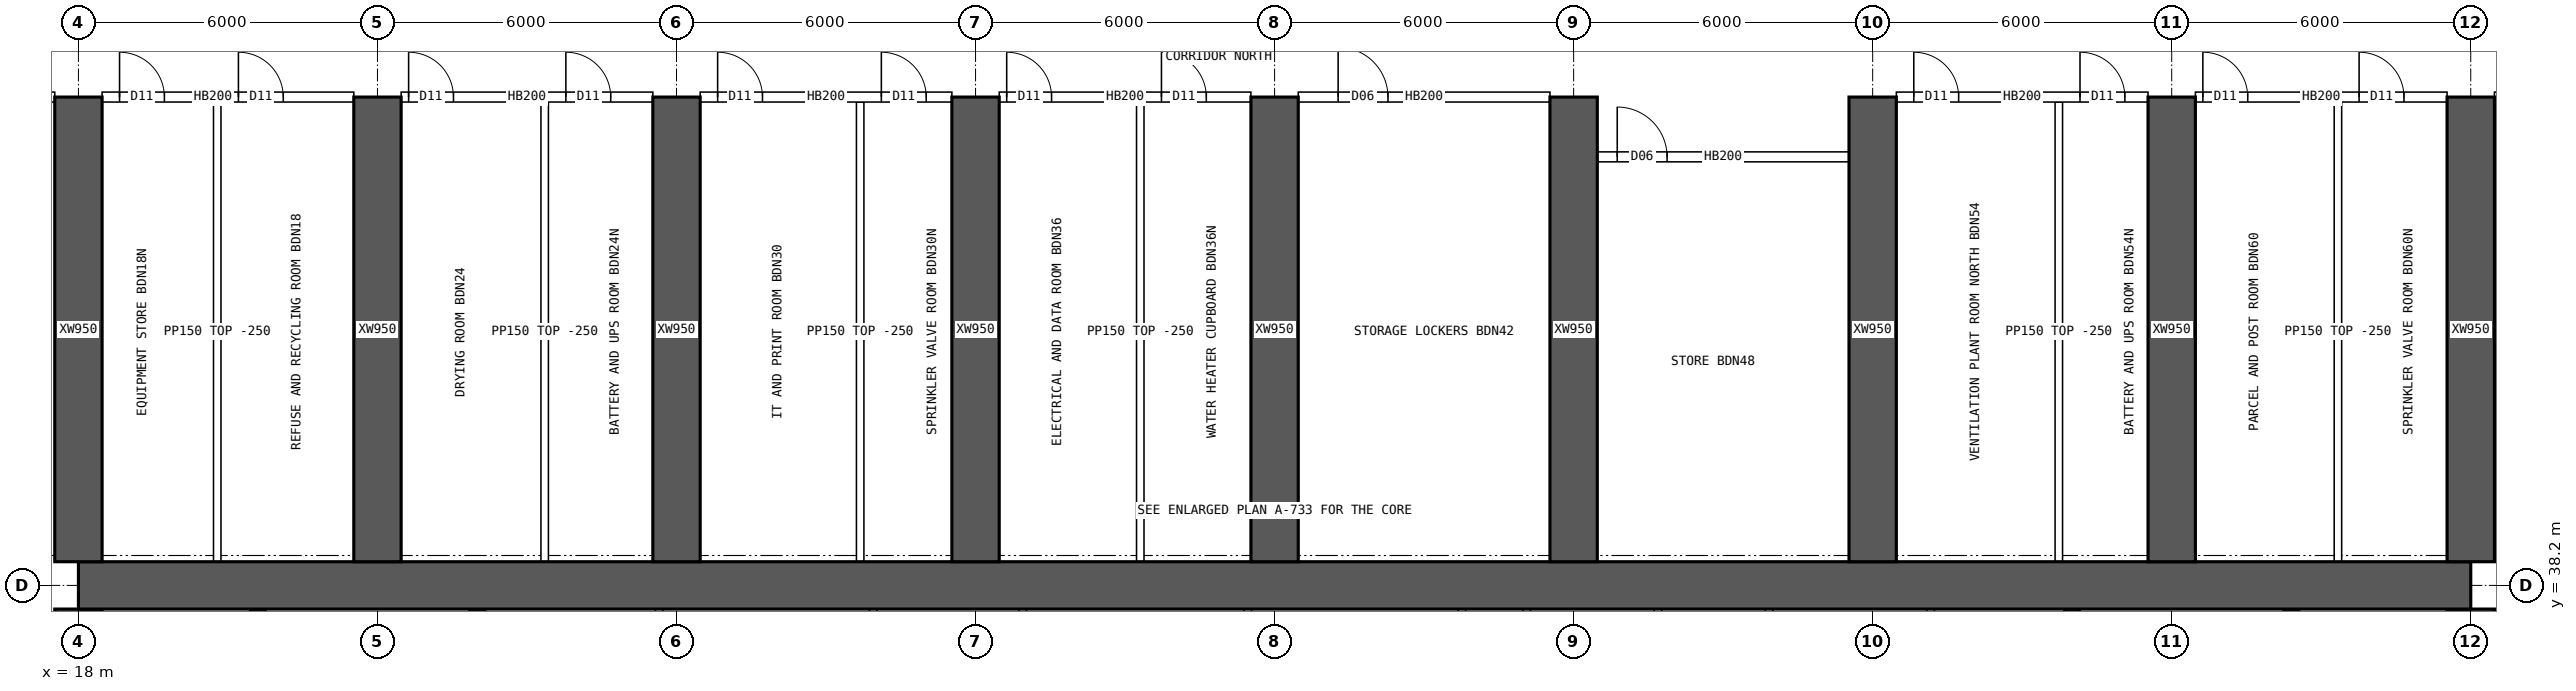
"""IFC4 building model, lengths in metres.
Left out: names, types, materials, properties, quantities, classifications, styles, units other than length and angle.
Written with IfcOpenShell. Run it as: python <this file> out.ifc"""

import sys

from ifc_helpers import new_model, si_unit, direction, frame, frame_2d, origin, place, context, subcontext, project, spatial, rectangle, extrude, element, fill, save


model = new_model("IFC4")
c1 = context("Model", 3, precision=1e-05, world=origin(), true_north=direction((0.0, 1.0)))
c2 = subcontext(c1, "Body", "Model", "MODEL_VIEW")
j1 = project(units=[si_unit("LENGTHUNIT", "METRE"), si_unit("PLANEANGLEUNIT", "RADIAN")], contexts=[c1])
p1 = place(None, origin())
s1 = spatial("IfcSite", under=j1, at=p1, CompositionType="ELEMENT")
p2 = place(p1, origin())
s2 = spatial("IfcBuilding", under=s1, at=p2, CompositionType="ELEMENT")
p3 = place(p2, frame((0.0, 0.0, 121.9)))
s3 = spatial("IfcBuildingStorey", under=s2, at=p3, CompositionType="ELEMENT", Elevation=121.9)
p4 = place(p3, frame((18.0, 38.2, 0.0), z_axis=(0.0, 0.0, 1.0), x_axis=(1.0, 0.0, 0.0)))
e1 = element("IfcWall", 1, at=p4, inside=s3, PredefinedType="SHEAR", context=c2, shape_type="SweptSolid", body=[
    extrude(rectangle(XDim=48.0, YDim=0.95, at=frame_2d((24.0, 0.0))), origin(), (0.0, 0.0, 1.0), 3.75),
])
p5 = place(p3, frame((18.0, 26.275, 0.0), z_axis=(0.0, 0.0, 1.0), x_axis=(0.0, 1.0, 0.0)))
e2 = element("IfcWall", 2, at=p5, inside=s3, PredefinedType="SHEAR", context=c2, shape_type="SweptSolid", body=[
    extrude(rectangle(XDim=11.45, YDim=0.95, at=frame_2d((5.725, 0.0))), origin(), (0.0, 0.0, 1.0), 3.75),
])
p6 = place(p5, frame((5.025, 0.0, 0.0)))
e3 = element("IfcOpeningElement", 3, at=p6, cuts=e2, PredefinedType="OPENING", context=c2, shape_type="SweptSolid", body=[
    extrude(rectangle(XDim=1.2, YDim=2.1, at=frame_2d((0.6, 1.05))), frame((0.0, 0.485, 0.0), z_axis=(0.0, -1.0, 0.0), x_axis=(1.0, 0.0, 0.0)), (0.0, 0.0, 1.0), 0.97),
])
p7 = place(p3, frame((66.0, 26.275, 0.0), z_axis=(0.0, 0.0, 1.0), x_axis=(0.0, 1.0, 0.0)))
e4 = element("IfcWall", 4, at=p7, inside=s3, PredefinedType="SHEAR", context=c2, shape_type="SweptSolid", body=[
    extrude(rectangle(XDim=11.45, YDim=0.95, at=frame_2d((5.725, 0.0))), origin(), (0.0, 0.0, 1.0), 3.75),
])
p8 = place(p7, frame((5.025, 0.0, 0.0)))
e5 = element("IfcOpeningElement", 5, at=p8, cuts=e4, PredefinedType="OPENING", context=c2, shape_type="SweptSolid", body=[
    extrude(rectangle(XDim=1.2, YDim=2.1, at=frame_2d((0.6, 1.05))), frame((0.0, 0.485, 0.0), z_axis=(0.0, -1.0, 0.0), x_axis=(1.0, 0.0, 0.0)), (0.0, 0.0, 1.0), 0.97),
])
for number, where, z_axis, x_axis in (
    (6, (21.6, 34.75, 0.0), (0.0, 0.0, 1.0), (0.0, 1.0, 0.0)),
    (7, (62.4, 34.75, 0.0), (0.0, 0.0, 1.0), (0.0, 1.0, 0.0)),
    (8, (26.0, 34.75, 0.0), (0.0, 0.0, 1.0), (0.0, 1.0, 0.0)),
    (9, (58.0, 34.75, 0.0), (0.0, 0.0, 1.0), (0.0, 1.0, 0.0)),
):
    element("IfcWall", number, at=place(p3, frame(where, z_axis=z_axis, x_axis=x_axis)), inside=s3, PredefinedType="SHEAR", context=c2, shape_type="SweptSolid", body=[
        extrude(rectangle(XDim=2.975, YDim=0.3, at=frame_2d((1.488, 0.0))), origin(), (0.0, 0.0, 1.0), 3.75),
    ])
for number, where, z_axis, x_axis in (
    (10, (18.0, 38.675, 0.0), (0.0, 0.0, 1.0), (0.0, 1.0, 0.0)),
    (11, (24.0, 38.675, 0.0), (0.0, 0.0, 1.0), (0.0, 1.0, 0.0)),
    (12, (30.0, 38.675, 0.0), (0.0, 0.0, 1.0), (0.0, 1.0, 0.0)),
    (13, (36.0, 38.675, 0.0), (0.0, 0.0, 1.0), (0.0, 1.0, 0.0)),
    (14, (42.0, 38.675, 0.0), (0.0, 0.0, 1.0), (0.0, 1.0, 0.0)),
    (15, (48.0, 38.675, 0.0), (0.0, 0.0, 1.0), (0.0, 1.0, 0.0)),
    (16, (54.0, 38.675, 0.0), (0.0, 0.0, 1.0), (0.0, 1.0, 0.0)),
    (17, (60.0, 38.675, 0.0), (0.0, 0.0, 1.0), (0.0, 1.0, 0.0)),
    (18, (66.0, 38.675, 0.0), (0.0, 0.0, 1.0), (0.0, 1.0, 0.0)),
):
    element("IfcWall", number, at=place(p3, frame(where, z_axis=z_axis, x_axis=x_axis)), inside=s3, PredefinedType="SHEAR", context=c2, shape_type="SweptSolid", body=[
        extrude(rectangle(XDim=9.325, YDim=0.95, at=frame_2d((4.663, 0.0))), origin(), (0.0, 0.0, 1.0), 3.75),
    ])
for number, where, z_axis, x_axis in (
    (19, (29.651, 34.75, 0.0), (0.0, 0.0, 1.0), (0.0, 1.0, 0.0)),
    (20, (33.946, 34.75, 0.0), (0.0, 0.0, 1.0), (0.0, 1.0, 0.0)),
    (21, (36.946, 34.75, 0.0), (0.0, 0.0, 1.0), (0.0, 1.0, 0.0)),
    (22, (41.463, 34.75, 0.0), (0.0, 0.0, 1.0), (0.0, 1.0, 0.0)),
    (23, (45.758, 34.75, 0.0), (0.0, 0.0, 1.0), (0.0, 1.0, 0.0)),
    (24, (47.058, 34.75, 0.0), (0.0, 0.0, 1.0), (0.0, 1.0, 0.0)),
    (25, (49.692, 34.75, 0.0), (0.0, 0.0, 1.0), (0.0, 1.0, 0.0)),
    (26, (51.921, 34.75, 0.0), (0.0, 0.0, 1.0), (0.0, 1.0, 0.0)),
    (27, (55.163, 34.75, 0.0), (0.0, 0.0, 1.0), (0.0, 1.0, 0.0)),
):
    element("IfcWall", number, at=place(p3, frame(where, z_axis=z_axis, x_axis=x_axis)), inside=s3, PredefinedType="SOLIDWALL", context=c2, shape_type="SweptSolid", body=[
        extrude(rectangle(XDim=2.975, YDim=0.15, at=frame_2d((1.488, 0.0))), origin(), (0.0, 0.0, 1.0), 3.5),
    ])
p9 = place(p3, frame((12.475, 48.0, 0.0), z_axis=(0.0, 0.0, 1.0), x_axis=(1.0, 0.0, 0.0)))
e28 = element("IfcWall", 28, at=p9, inside=s3, PredefinedType="SOLIDWALL", context=c2, shape_type="SweptSolid", body=[
    extrude(rectangle(XDim=5.05, YDim=0.2, at=frame_2d((2.525, 0.0))), origin(), (0.0, 0.0, 1.0), 3.5),
])
p10 = place(p9, frame((3.325, 0.0, 0.0)))
e29 = element("IfcOpeningElement", 29, at=p10, cuts=e28, PredefinedType="OPENING", context=c2, shape_type="SweptSolid", body=[
    extrude(rectangle(XDim=1.6, YDim=2.1, at=frame_2d((0.8, 1.05))), frame((0.0, 0.11, 0.0), z_axis=(0.0, -1.0, 0.0), x_axis=(1.0, 0.0, 0.0)), (0.0, 0.0, 1.0), 0.22),
])
p11 = place(p3, frame((18.475, 48.0, 0.0), z_axis=(0.0, 0.0, 1.0), x_axis=(1.0, 0.0, 0.0)))
e30 = element("IfcWall", 30, at=p11, inside=s3, PredefinedType="SOLIDWALL", context=c2, shape_type="SweptSolid", body=[
    extrude(rectangle(XDim=5.05, YDim=0.2, at=frame_2d((2.525, 0.0))), origin(), (0.0, 0.0, 1.0), 3.5),
])
p12 = place(p11, frame((0.35, 0.0, 0.0)))
e31 = element("IfcOpeningElement", 31, at=p12, cuts=e30, PredefinedType="OPENING", context=c2, shape_type="SweptSolid", body=[
    extrude(rectangle(XDim=0.9, YDim=2.1, at=frame_2d((0.45, 1.05))), frame((0.0, 0.11, 0.0), z_axis=(0.0, -1.0, 0.0), x_axis=(1.0, 0.0, 0.0)), (0.0, 0.0, 1.0), 0.22),
])
p13 = place(p11, frame((2.735, 0.0, 0.0)))
e32 = element("IfcOpeningElement", 32, at=p13, cuts=e30, PredefinedType="OPENING", context=c2, shape_type="SweptSolid", body=[
    extrude(rectangle(XDim=0.9, YDim=2.1, at=frame_2d((0.45, 1.05))), frame((0.0, 0.11, 0.0), z_axis=(0.0, -1.0, 0.0), x_axis=(1.0, 0.0, 0.0)), (0.0, 0.0, 1.0), 0.22),
])
p14 = place(p3, frame((24.475, 48.0, 0.0), z_axis=(0.0, 0.0, 1.0), x_axis=(1.0, 0.0, 0.0)))
e33 = element("IfcWall", 33, at=p14, inside=s3, PredefinedType="SOLIDWALL", context=c2, shape_type="SweptSolid", body=[
    extrude(rectangle(XDim=5.05, YDim=0.2, at=frame_2d((2.525, 0.0))), origin(), (0.0, 0.0, 1.0), 3.5),
])
p15 = place(p14, frame((0.15, 0.0, 0.0)))
e34 = element("IfcOpeningElement", 34, at=p15, cuts=e33, PredefinedType="OPENING", context=c2, shape_type="SweptSolid", body=[
    extrude(rectangle(XDim=0.9, YDim=2.1, at=frame_2d((0.45, 1.05))), frame((0.0, 0.11, 0.0), z_axis=(0.0, -1.0, 0.0), x_axis=(1.0, 0.0, 0.0)), (0.0, 0.0, 1.0), 0.22),
])
p16 = place(p14, frame((3.305, 0.0, 0.0)))
e35 = element("IfcOpeningElement", 35, at=p16, cuts=e33, PredefinedType="OPENING", context=c2, shape_type="SweptSolid", body=[
    extrude(rectangle(XDim=0.9, YDim=2.1, at=frame_2d((0.45, 1.05))), frame((0.0, 0.11, 0.0), z_axis=(0.0, -1.0, 0.0), x_axis=(1.0, 0.0, 0.0)), (0.0, 0.0, 1.0), 0.22),
])
p17 = place(p3, frame((30.475, 48.0, 0.0), z_axis=(0.0, 0.0, 1.0), x_axis=(1.0, 0.0, 0.0)))
e36 = element("IfcWall", 36, at=p17, inside=s3, PredefinedType="SOLIDWALL", context=c2, shape_type="SweptSolid", body=[
    extrude(rectangle(XDim=5.05, YDim=0.2, at=frame_2d((2.525, 0.0))), origin(), (0.0, 0.0, 1.0), 3.5),
])
p18 = place(p17, frame((0.35, 0.0, 0.0)))
e37 = element("IfcOpeningElement", 37, at=p18, cuts=e36, PredefinedType="OPENING", context=c2, shape_type="SweptSolid", body=[
    extrude(rectangle(XDim=0.9, YDim=2.1, at=frame_2d((0.45, 1.05))), frame((0.0, 0.11, 0.0), z_axis=(0.0, -1.0, 0.0), x_axis=(1.0, 0.0, 0.0)), (0.0, 0.0, 1.0), 0.22),
])
p19 = place(p17, frame((3.635, 0.0, 0.0)))
e38 = element("IfcOpeningElement", 38, at=p19, cuts=e36, PredefinedType="OPENING", context=c2, shape_type="SweptSolid", body=[
    extrude(rectangle(XDim=0.9, YDim=2.1, at=frame_2d((0.45, 1.05))), frame((0.0, 0.11, 0.0), z_axis=(0.0, -1.0, 0.0), x_axis=(1.0, 0.0, 0.0)), (0.0, 0.0, 1.0), 0.22),
])
p20 = place(p3, frame((36.475, 48.0, 0.0), z_axis=(0.0, 0.0, 1.0), x_axis=(1.0, 0.0, 0.0)))
e39 = element("IfcWall", 39, at=p20, inside=s3, PredefinedType="SOLIDWALL", context=c2, shape_type="SweptSolid", body=[
    extrude(rectangle(XDim=5.05, YDim=0.2, at=frame_2d((2.525, 0.0))), origin(), (0.0, 0.0, 1.0), 3.5),
])
p21 = place(p20, frame((0.15, 0.0, 0.0)))
e40 = element("IfcOpeningElement", 40, at=p21, cuts=e39, PredefinedType="OPENING", context=c2, shape_type="SweptSolid", body=[
    extrude(rectangle(XDim=0.9, YDim=2.1, at=frame_2d((0.45, 1.05))), frame((0.0, 0.11, 0.0), z_axis=(0.0, -1.0, 0.0), x_axis=(1.0, 0.0, 0.0)), (0.0, 0.0, 1.0), 0.22),
])
p22 = place(p20, frame((3.255, 0.0, 0.0)))
e41 = element("IfcOpeningElement", 41, at=p22, cuts=e39, PredefinedType="OPENING", context=c2, shape_type="SweptSolid", body=[
    extrude(rectangle(XDim=0.9, YDim=2.1, at=frame_2d((0.45, 1.05))), frame((0.0, 0.11, 0.0), z_axis=(0.0, -1.0, 0.0), x_axis=(1.0, 0.0, 0.0)), (0.0, 0.0, 1.0), 0.22),
])
p23 = place(p3, frame((42.475, 48.0, 0.0), z_axis=(0.0, 0.0, 1.0), x_axis=(1.0, 0.0, 0.0)))
e42 = element("IfcWall", 42, at=p23, inside=s3, PredefinedType="SOLIDWALL", context=c2, shape_type="SweptSolid", body=[
    extrude(rectangle(XDim=5.05, YDim=0.2, at=frame_2d((2.525, 0.0))), origin(), (0.0, 0.0, 1.0), 3.5),
])
p24 = place(p23, frame((0.8, 0.0, 0.0)))
e43 = element("IfcOpeningElement", 43, at=p24, cuts=e42, PredefinedType="OPENING", context=c2, shape_type="SweptSolid", body=[
    extrude(rectangle(XDim=1.0, YDim=2.1, at=frame_2d((0.5, 1.05))), frame((0.0, 0.11, 0.0), z_axis=(0.0, -1.0, 0.0), x_axis=(1.0, 0.0, 0.0)), (0.0, 0.0, 1.0), 0.22),
])
p25 = place(p3, frame((54.475, 48.0, 0.0), z_axis=(0.0, 0.0, 1.0), x_axis=(1.0, 0.0, 0.0)))
e44 = element("IfcWall", 44, at=p25, inside=s3, PredefinedType="SOLIDWALL", context=c2, shape_type="SweptSolid", body=[
    extrude(rectangle(XDim=5.05, YDim=0.2, at=frame_2d((2.525, 0.0))), origin(), (0.0, 0.0, 1.0), 3.5),
])
p26 = place(p25, frame((0.35, 0.0, 0.0)))
e45 = element("IfcOpeningElement", 45, at=p26, cuts=e44, PredefinedType="OPENING", context=c2, shape_type="SweptSolid", body=[
    extrude(rectangle(XDim=0.9, YDim=2.1, at=frame_2d((0.45, 1.05))), frame((0.0, 0.11, 0.0), z_axis=(0.0, -1.0, 0.0), x_axis=(1.0, 0.0, 0.0)), (0.0, 0.0, 1.0), 0.22),
])
p27 = place(p25, frame((3.685, 0.0, 0.0)))
e46 = element("IfcOpeningElement", 46, at=p27, cuts=e44, PredefinedType="OPENING", context=c2, shape_type="SweptSolid", body=[
    extrude(rectangle(XDim=0.9, YDim=2.1, at=frame_2d((0.45, 1.05))), frame((0.0, 0.11, 0.0), z_axis=(0.0, -1.0, 0.0), x_axis=(1.0, 0.0, 0.0)), (0.0, 0.0, 1.0), 0.22),
])
p28 = place(p3, frame((60.475, 48.0, 0.0), z_axis=(0.0, 0.0, 1.0), x_axis=(1.0, 0.0, 0.0)))
e47 = element("IfcWall", 47, at=p28, inside=s3, PredefinedType="SOLIDWALL", context=c2, shape_type="SweptSolid", body=[
    extrude(rectangle(XDim=5.05, YDim=0.2, at=frame_2d((2.525, 0.0))), origin(), (0.0, 0.0, 1.0), 3.5),
])
p29 = place(p28, frame((0.15, 0.0, 0.0)))
e48 = element("IfcOpeningElement", 48, at=p29, cuts=e47, PredefinedType="OPENING", context=c2, shape_type="SweptSolid", body=[
    extrude(rectangle(XDim=0.9, YDim=2.1, at=frame_2d((0.45, 1.05))), frame((0.0, 0.11, 0.0), z_axis=(0.0, -1.0, 0.0), x_axis=(1.0, 0.0, 0.0)), (0.0, 0.0, 1.0), 0.22),
])
p30 = place(p28, frame((3.285, 0.0, 0.0)))
e49 = element("IfcOpeningElement", 49, at=p30, cuts=e47, PredefinedType="OPENING", context=c2, shape_type="SweptSolid", body=[
    extrude(rectangle(XDim=0.9, YDim=2.1, at=frame_2d((0.45, 1.05))), frame((0.0, 0.11, 0.0), z_axis=(0.0, -1.0, 0.0), x_axis=(1.0, 0.0, 0.0)), (0.0, 0.0, 1.0), 0.22),
])
p31 = place(p3, frame((66.475, 48.0, 0.0), z_axis=(0.0, 0.0, 1.0), x_axis=(1.0, 0.0, 0.0)))
e50 = element("IfcWall", 50, at=p31, inside=s3, PredefinedType="SOLIDWALL", context=c2, shape_type="SweptSolid", body=[
    extrude(rectangle(XDim=1.925, YDim=0.2, at=frame_2d((0.962, 0.0))), origin(), (0.0, 0.0, 1.0), 3.5),
])
p32 = place(p31, frame((0.05, 0.0, 0.0)))
e51 = element("IfcOpeningElement", 51, at=p32, cuts=e50, PredefinedType="OPENING", context=c2, shape_type="SweptSolid", body=[
    extrude(rectangle(XDim=1.2, YDim=2.1, at=frame_2d((0.6, 1.05))), frame((0.0, 0.11, 0.0), z_axis=(0.0, -1.0, 0.0), x_axis=(1.0, 0.0, 0.0)), (0.0, 0.0, 1.0), 0.22),
])
for number, where, z_axis, x_axis in (
    (52, (20.785, 38.675, 0.0), (0.0, 0.0, 1.0), (0.0, 1.0, 0.0)),
    (53, (27.355, 38.675, 0.0), (0.0, 0.0, 1.0), (0.0, 1.0, 0.0)),
    (54, (33.685, 38.675, 0.0), (0.0, 0.0, 1.0), (0.0, 1.0, 0.0)),
    (55, (39.305, 38.675, 0.0), (0.0, 0.0, 1.0), (0.0, 1.0, 0.0)),
):
    element("IfcWall", number, at=place(p3, frame(where, z_axis=z_axis, x_axis=x_axis)), inside=s3, PredefinedType="PARTITIONING", context=c2, shape_type="SweptSolid", body=[
        extrude(rectangle(XDim=9.225, YDim=0.15, at=frame_2d((4.612, 0.0))), origin(), (0.0, 0.0, 1.0), 3.5),
    ])
p33 = place(p3, frame((48.475, 46.8, 0.0), z_axis=(0.0, 0.0, 1.0), x_axis=(1.0, 0.0, 0.0)))
e56 = element("IfcWall", 56, at=p33, inside=s3, PredefinedType="SOLIDWALL", context=c2, shape_type="SweptSolid", body=[
    extrude(rectangle(XDim=5.05, YDim=0.2, at=frame_2d((2.525, 0.0))), origin(), (0.0, 0.0, 1.0), 3.5),
])
p34 = place(p33, frame((0.4, 0.0, 0.0)))
e57 = element("IfcOpeningElement", 57, at=p34, cuts=e56, PredefinedType="OPENING", context=c2, shape_type="SweptSolid", body=[
    extrude(rectangle(XDim=1.0, YDim=2.1, at=frame_2d((0.5, 1.05))), frame((0.0, 0.11, 0.0), z_axis=(0.0, -1.0, 0.0), x_axis=(1.0, 0.0, 0.0)), (0.0, 0.0, 1.0), 0.22),
])
for number, where, z_axis, x_axis in (
    (58, (57.735, 38.675, 0.0), (0.0, 0.0, 1.0), (0.0, 1.0, 0.0)),
    (59, (63.335, 38.675, 0.0), (0.0, 0.0, 1.0), (0.0, 1.0, 0.0)),
):
    element("IfcWall", number, at=place(p3, frame(where, z_axis=z_axis, x_axis=x_axis)), inside=s3, PredefinedType="PARTITIONING", context=c2, shape_type="SweptSolid", body=[
        extrude(rectangle(XDim=9.225, YDim=0.15, at=frame_2d((4.612, 0.0))), origin(), (0.0, 0.0, 1.0), 3.5),
    ])
p35 = place(p12, origin())
e60 = element("IfcDoor", 60, at=p35, inside=s3, OperationType="SINGLE_SWING_LEFT", PredefinedType="DOOR", context=c2, shape_type="SweptSolid", body=[
    extrude(rectangle(XDim=0.9, YDim=2.1, at=frame_2d((0.45, 1.05))), frame((0.0, 0.025, 0.0), z_axis=(0.0, -1.0, 0.0), x_axis=(1.0, 0.0, 0.0)), (0.0, 0.0, 1.0), 0.05),
])
fill(e31, e60)
p36 = place(p13, origin())
e61 = element("IfcDoor", 61, at=p36, inside=s3, OperationType="SINGLE_SWING_LEFT", PredefinedType="DOOR", context=c2, shape_type="SweptSolid", body=[
    extrude(rectangle(XDim=0.9, YDim=2.1, at=frame_2d((0.45, 1.05))), frame((0.0, 0.025, 0.0), z_axis=(0.0, -1.0, 0.0), x_axis=(1.0, 0.0, 0.0)), (0.0, 0.0, 1.0), 0.05),
])
fill(e32, e61)
p37 = place(p15, origin())
e62 = element("IfcDoor", 62, at=p37, inside=s3, OperationType="SINGLE_SWING_LEFT", PredefinedType="DOOR", context=c2, shape_type="SweptSolid", body=[
    extrude(rectangle(XDim=0.9, YDim=2.1, at=frame_2d((0.45, 1.05))), frame((0.0, 0.025, 0.0), z_axis=(0.0, -1.0, 0.0), x_axis=(1.0, 0.0, 0.0)), (0.0, 0.0, 1.0), 0.05),
])
fill(e34, e62)
p38 = place(p16, origin())
e63 = element("IfcDoor", 63, at=p38, inside=s3, OperationType="SINGLE_SWING_LEFT", PredefinedType="DOOR", context=c2, shape_type="SweptSolid", body=[
    extrude(rectangle(XDim=0.9, YDim=2.1, at=frame_2d((0.45, 1.05))), frame((0.0, 0.025, 0.0), z_axis=(0.0, -1.0, 0.0), x_axis=(1.0, 0.0, 0.0)), (0.0, 0.0, 1.0), 0.05),
])
fill(e35, e63)
p39 = place(p18, origin())
e64 = element("IfcDoor", 64, at=p39, inside=s3, OperationType="SINGLE_SWING_LEFT", PredefinedType="DOOR", context=c2, shape_type="SweptSolid", body=[
    extrude(rectangle(XDim=0.9, YDim=2.1, at=frame_2d((0.45, 1.05))), frame((0.0, 0.025, 0.0), z_axis=(0.0, -1.0, 0.0), x_axis=(1.0, 0.0, 0.0)), (0.0, 0.0, 1.0), 0.05),
])
fill(e37, e64)
p40 = place(p19, origin())
e65 = element("IfcDoor", 65, at=p40, inside=s3, OperationType="SINGLE_SWING_LEFT", PredefinedType="DOOR", context=c2, shape_type="SweptSolid", body=[
    extrude(rectangle(XDim=0.9, YDim=2.1, at=frame_2d((0.45, 1.05))), frame((0.0, 0.025, 0.0), z_axis=(0.0, -1.0, 0.0), x_axis=(1.0, 0.0, 0.0)), (0.0, 0.0, 1.0), 0.05),
])
fill(e38, e65)
p41 = place(p21, origin())
e66 = element("IfcDoor", 66, at=p41, inside=s3, OperationType="SINGLE_SWING_LEFT", PredefinedType="DOOR", context=c2, shape_type="SweptSolid", body=[
    extrude(rectangle(XDim=0.9, YDim=2.1, at=frame_2d((0.45, 1.05))), frame((0.0, 0.025, 0.0), z_axis=(0.0, -1.0, 0.0), x_axis=(1.0, 0.0, 0.0)), (0.0, 0.0, 1.0), 0.05),
])
fill(e40, e66)
p42 = place(p22, origin())
e67 = element("IfcDoor", 67, at=p42, inside=s3, OperationType="SINGLE_SWING_LEFT", PredefinedType="DOOR", context=c2, shape_type="SweptSolid", body=[
    extrude(rectangle(XDim=0.9, YDim=2.1, at=frame_2d((0.45, 1.05))), frame((0.0, 0.025, 0.0), z_axis=(0.0, -1.0, 0.0), x_axis=(1.0, 0.0, 0.0)), (0.0, 0.0, 1.0), 0.05),
])
fill(e41, e67)
p43 = place(p24, origin())
e68 = element("IfcDoor", 68, at=p43, inside=s3, OperationType="SINGLE_SWING_LEFT", PredefinedType="DOOR", context=c2, shape_type="SweptSolid", body=[
    extrude(rectangle(XDim=1.0, YDim=2.1, at=frame_2d((0.5, 1.05))), frame((0.0, 0.025, 0.0), z_axis=(0.0, -1.0, 0.0), x_axis=(1.0, 0.0, 0.0)), (0.0, 0.0, 1.0), 0.05),
])
fill(e43, e68)
p44 = place(p34, origin())
e69 = element("IfcDoor", 69, at=p44, inside=s3, OperationType="SINGLE_SWING_LEFT", PredefinedType="DOOR", context=c2, shape_type="SweptSolid", body=[
    extrude(rectangle(XDim=1.0, YDim=2.1, at=frame_2d((0.5, 1.05))), frame((0.0, 0.025, 0.0), z_axis=(0.0, -1.0, 0.0), x_axis=(1.0, 0.0, 0.0)), (0.0, 0.0, 1.0), 0.05),
])
fill(e57, e69)
p45 = place(p26, origin())
e70 = element("IfcDoor", 70, at=p45, inside=s3, OperationType="SINGLE_SWING_LEFT", PredefinedType="DOOR", context=c2, shape_type="SweptSolid", body=[
    extrude(rectangle(XDim=0.9, YDim=2.1, at=frame_2d((0.45, 1.05))), frame((0.0, 0.025, 0.0), z_axis=(0.0, -1.0, 0.0), x_axis=(1.0, 0.0, 0.0)), (0.0, 0.0, 1.0), 0.05),
])
fill(e45, e70)
p46 = place(p27, origin())
e71 = element("IfcDoor", 71, at=p46, inside=s3, OperationType="SINGLE_SWING_LEFT", PredefinedType="DOOR", context=c2, shape_type="SweptSolid", body=[
    extrude(rectangle(XDim=0.9, YDim=2.1, at=frame_2d((0.45, 1.05))), frame((0.0, 0.025, 0.0), z_axis=(0.0, -1.0, 0.0), x_axis=(1.0, 0.0, 0.0)), (0.0, 0.0, 1.0), 0.05),
])
fill(e46, e71)
p47 = place(p29, origin())
e72 = element("IfcDoor", 72, at=p47, inside=s3, OperationType="SINGLE_SWING_LEFT", PredefinedType="DOOR", context=c2, shape_type="SweptSolid", body=[
    extrude(rectangle(XDim=0.9, YDim=2.1, at=frame_2d((0.45, 1.05))), frame((0.0, 0.025, 0.0), z_axis=(0.0, -1.0, 0.0), x_axis=(1.0, 0.0, 0.0)), (0.0, 0.0, 1.0), 0.05),
])
fill(e48, e72)
p48 = place(p30, origin())
e73 = element("IfcDoor", 73, at=p48, inside=s3, OperationType="SINGLE_SWING_LEFT", PredefinedType="DOOR", context=c2, shape_type="SweptSolid", body=[
    extrude(rectangle(XDim=0.9, YDim=2.1, at=frame_2d((0.45, 1.05))), frame((0.0, 0.025, 0.0), z_axis=(0.0, -1.0, 0.0), x_axis=(1.0, 0.0, 0.0)), (0.0, 0.0, 1.0), 0.05),
])
fill(e49, e73)
save(model, sys.argv[1])
